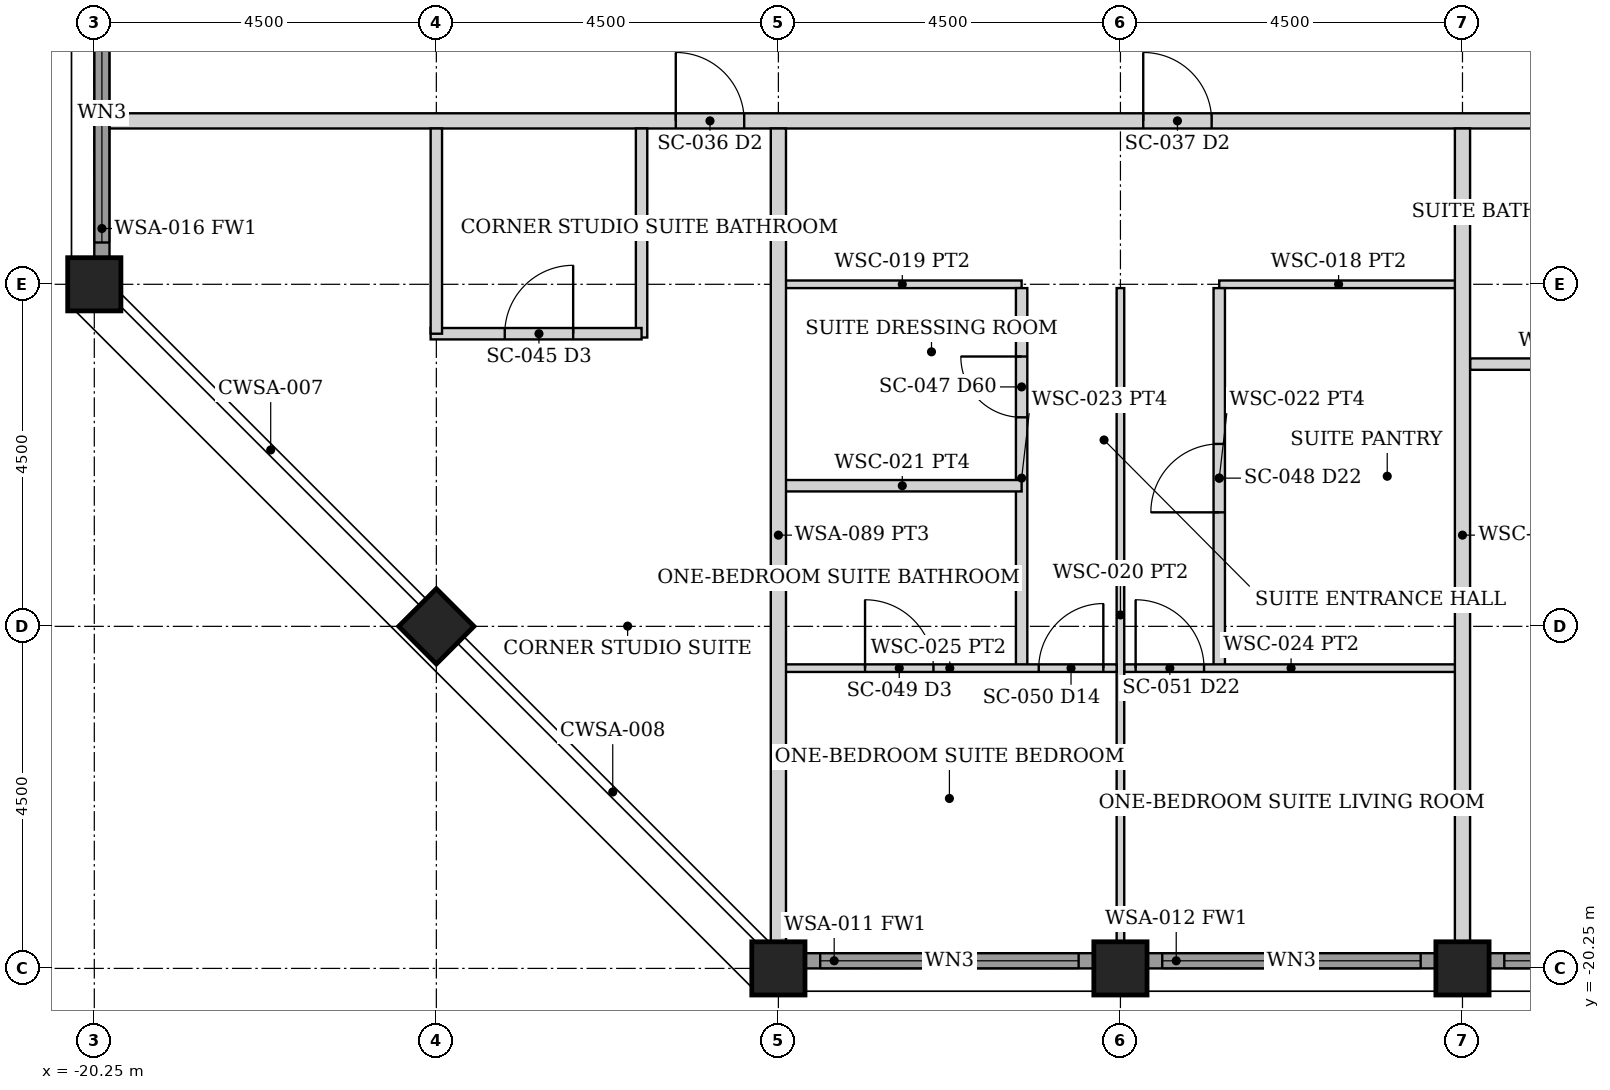
"""IFC4 building model, lengths in metres.
Left out: names, types, materials, properties, quantities, classifications, styles, units other than length and angle.
Written with IfcOpenShell. Run it as: python <this file> out.ifc"""

import sys

from ifc_helpers import new_model, si_unit, direction, frame, frame_2d, origin, origin_2d, place, context, subcontext, project, spatial, rectangle, hollow_rectangle, extrude, element, fill, save


model = new_model("IFC4")
c1 = context("Model", 3, precision=1e-05, world=origin(), true_north=direction((0.0, 1.0)))
c2 = subcontext(c1, "Body", "Model", "MODEL_VIEW")
j1 = project(units=[si_unit("LENGTHUNIT", "METRE"), si_unit("PLANEANGLEUNIT", "RADIAN")], contexts=[c1])
p1 = place(None, origin())
s1 = spatial("IfcSite", under=j1, at=p1, CompositionType="ELEMENT")
p2 = place(p1, origin())
s2 = spatial("IfcBuilding", under=s1, at=p2, CompositionType="ELEMENT")
p3 = place(p2, frame((0.0, 0.0, 223.3)))
s3 = spatial("IfcBuildingStorey", under=s2, at=p3, CompositionType="ELEMENT", Elevation=223.3)
for number, where, z_axis, x_axis in (
    (1, (-11.25, -20.25, 0.0), (0.0, 0.0, 1.0), (0.0, 1.0, 0.0)),
    (2, (-20.25, -11.25, 0.0), (0.0, 0.0, 1.0), (1.0, 0.0, 0.0)),
    (3, (-6.75, -20.25, 0.0), (0.0, 0.0, 1.0), (0.0, 1.0, 0.0)),
    (4, (-2.25, -20.25, 0.0), (0.0, 0.0, 1.0), (0.0, 1.0, 0.0)),
    (5, (-15.75, -15.75, 0.0), (0.0, 0.0, 1.0), (0.707, 0.707, 0.0)),
):
    element("IfcColumn", number, at=place(p3, frame(where, z_axis=z_axis, x_axis=x_axis)), inside=s3, PredefinedType="COLUMN", context=c2, shape_type="SweptSolid", body=[
        extrude(hollow_rectangle(XDim=0.7, YDim=0.7, WallThickness=0.04, at=origin_2d()), origin(), (0.0, 0.0, 1.0), 3.75),
    ])
p4 = place(p3, frame((-10.895, -20.15, 0.0), z_axis=(0.0, 0.0, 1.0), x_axis=(1.0, 0.0, 0.0)))
e6 = element("IfcWall", 6, at=p4, inside=s3, PredefinedType="SOLIDWALL", context=c2, shape_type="SweptSolid", body=[
    extrude(rectangle(XDim=3.79, YDim=0.2, at=frame_2d((1.895, 0.0))), origin(), (0.0, 0.0, 1.0), 2.629),
])
p5 = place(p4, frame((0.195, 0.0, 0.3)))
e7 = element("IfcOpeningElement", 7, at=p5, cuts=e6, PredefinedType="OPENING", context=c2, shape_type="SweptSolid", body=[
    extrude(rectangle(XDim=3.4, YDim=2.179, at=frame_2d((1.7, 1.089))), frame((0.0, 0.11, 0.0), z_axis=(0.0, -1.0, 0.0), x_axis=(1.0, 0.0, 0.0)), (0.0, 0.0, 1.0), 0.22),
])
p6 = place(p3, frame((-6.395, -20.15, 0.0), z_axis=(0.0, 0.0, 1.0), x_axis=(1.0, 0.0, 0.0)))
e8 = element("IfcWall", 8, at=p6, inside=s3, PredefinedType="SOLIDWALL", context=c2, shape_type="SweptSolid", body=[
    extrude(rectangle(XDim=3.79, YDim=0.2, at=frame_2d((1.895, 0.0))), origin(), (0.0, 0.0, 1.0), 2.629),
])
p7 = place(p6, frame((0.195, 0.0, 0.3)))
e9 = element("IfcOpeningElement", 9, at=p7, cuts=e8, PredefinedType="OPENING", context=c2, shape_type="SweptSolid", body=[
    extrude(rectangle(XDim=3.4, YDim=2.179, at=frame_2d((1.7, 1.089))), frame((0.0, 0.11, 0.0), z_axis=(0.0, -1.0, 0.0), x_axis=(1.0, 0.0, 0.0)), (0.0, 0.0, 1.0), 0.22),
])
p8 = place(p3, frame((-1.895, -20.15, 0.0), z_axis=(0.0, 0.0, 1.0), x_axis=(1.0, 0.0, 0.0)))
e10 = element("IfcWall", 10, at=p8, inside=s3, PredefinedType="SOLIDWALL", context=c2, shape_type="SweptSolid", body=[
    extrude(rectangle(XDim=3.79, YDim=0.2, at=frame_2d((1.895, 0.0))), origin(), (0.0, 0.0, 1.0), 2.629),
])
p9 = place(p8, frame((0.195, 0.0, 0.3)))
e11 = element("IfcOpeningElement", 11, at=p9, cuts=e10, PredefinedType="OPENING", context=c2, shape_type="SweptSolid", body=[
    extrude(rectangle(XDim=3.4, YDim=2.179, at=frame_2d((1.7, 1.089))), frame((0.0, 0.11, 0.0), z_axis=(0.0, -1.0, 0.0), x_axis=(1.0, 0.0, 0.0)), (0.0, 0.0, 1.0), 0.22),
])
p10 = place(p3, frame((-20.15, -10.895, 0.0), z_axis=(0.0, 0.0, 1.0), x_axis=(0.0, 1.0, 0.0)))
e12 = element("IfcWall", 12, at=p10, inside=s3, PredefinedType="SOLIDWALL", context=c2, shape_type="SweptSolid", body=[
    extrude(rectangle(XDim=3.79, YDim=0.2, at=frame_2d((1.895, 0.0))), origin(), (0.0, 0.0, 1.0), 2.629),
])
p11 = place(p10, frame((0.195, 0.0, 0.3)))
e13 = element("IfcOpeningElement", 13, at=p11, cuts=e12, PredefinedType="OPENING", context=c2, shape_type="SweptSolid", body=[
    extrude(rectangle(XDim=3.4, YDim=2.179, at=frame_2d((1.7, 1.089))), frame((0.0, 0.11, 0.0), z_axis=(0.0, -1.0, 0.0), x_axis=(1.0, 0.0, 0.0)), (0.0, 0.0, 1.0), 0.22),
])
p12 = place(p3, frame((-20.05, -9.1, 0.0), z_axis=(0.0, 0.0, 1.0), x_axis=(1.0, 0.0, 0.0)))
e14 = element("IfcWall", 14, at=p12, inside=s3, PredefinedType="PARTITIONING", context=c2, shape_type="SweptSolid", body=[
    extrude(rectangle(XDim=40.1, YDim=0.2, at=frame_2d((20.05, 0.0))), origin(), (0.0, 0.0, 1.0), 2.629),
])
p13 = place(p12, frame((13.6, 0.0, 0.0)))
e15 = element("IfcOpeningElement", 15, at=p13, cuts=e14, PredefinedType="OPENING", context=c2, shape_type="SweptSolid", body=[
    extrude(rectangle(XDim=0.9, YDim=2.1, at=frame_2d((0.45, 1.05))), frame((0.0, 0.11, 0.0), z_axis=(0.0, -1.0, 0.0), x_axis=(1.0, 0.0, 0.0)), (0.0, 0.0, 1.0), 0.22),
])
p14 = place(p12, frame((21.2, 0.0, 0.0)))
e16 = element("IfcOpeningElement", 16, at=p14, cuts=e14, PredefinedType="OPENING", context=c2, shape_type="SweptSolid", body=[
    extrude(rectangle(XDim=0.9, YDim=2.1, at=frame_2d((0.45, 1.05))), frame((0.0, 0.11, 0.0), z_axis=(0.0, -1.0, 0.0), x_axis=(1.0, 0.0, 0.0)), (0.0, 0.0, 1.0), 0.22),
])
p15 = place(p12, frame((22.5, 0.0, 0.0)))
e17 = element("IfcOpeningElement", 17, at=p15, cuts=e14, PredefinedType="OPENING", context=c2, shape_type="SweptSolid", body=[
    extrude(rectangle(XDim=0.9, YDim=2.1, at=frame_2d((0.45, 1.05))), frame((0.0, 0.11, 0.0), z_axis=(0.0, -1.0, 0.0), x_axis=(1.0, 0.0, 0.0)), (0.0, 0.0, 1.0), 0.22),
])
p16 = place(p12, frame((30.2, 0.0, 0.0)))
e18 = element("IfcOpeningElement", 18, at=p16, cuts=e14, PredefinedType="OPENING", context=c2, shape_type="SweptSolid", body=[
    extrude(rectangle(XDim=0.9, YDim=2.1, at=frame_2d((0.45, 1.05))), frame((0.0, 0.11, 0.0), z_axis=(0.0, -1.0, 0.0), x_axis=(1.0, 0.0, 0.0)), (0.0, 0.0, 1.0), 0.22),
])
p17 = place(p12, frame((31.75, 0.0, 0.0)))
e19 = element("IfcOpeningElement", 19, at=p17, cuts=e14, PredefinedType="OPENING", context=c2, shape_type="SweptSolid", body=[
    extrude(rectangle(XDim=0.9, YDim=2.1, at=frame_2d((0.45, 1.05))), frame((0.0, 0.11, 0.0), z_axis=(0.0, -1.0, 0.0), x_axis=(1.0, 0.0, 0.0)), (0.0, 0.0, 1.0), 0.22),
])
p18 = place(p12, frame((7.45, 0.0, 0.0)))
e20 = element("IfcOpeningElement", 20, at=p18, cuts=e14, PredefinedType="OPENING", context=c2, shape_type="SweptSolid", body=[
    extrude(rectangle(XDim=0.9, YDim=2.1, at=frame_2d((0.45, 1.05))), frame((0.0, 0.11, 0.0), z_axis=(0.0, -1.0, 0.0), x_axis=(1.0, 0.0, 0.0)), (0.0, 0.0, 1.0), 0.22),
])
p19 = place(p3, frame((-5.45, -11.25, 0.0), z_axis=(0.0, 0.0, 1.0), x_axis=(1.0, 0.0, 0.0)))
e21 = element("IfcWall", 21, at=p19, inside=s3, PredefinedType="PARTITIONING", context=c2, shape_type="SweptSolid", body=[
    extrude(rectangle(XDim=3.14, YDim=0.1, at=frame_2d((1.57, 0.0))), origin(), (0.0, 0.0, 1.0), 2.629),
])
p20 = place(p3, frame((-5.45, -16.3, 0.0), z_axis=(0.0, 0.0, 1.0), x_axis=(0.0, 1.0, 0.0)))
e22 = element("IfcWall", 22, at=p20, inside=s3, PredefinedType="PARTITIONING", context=c2, shape_type="SweptSolid", body=[
    extrude(rectangle(XDim=5.0, YDim=0.15, at=frame_2d((2.5, 0.0))), origin(), (0.0, 0.0, 1.0), 2.629),
])
p21 = place(p20, frame((2.05, 0.0, 0.0)))
e23 = element("IfcOpeningElement", 23, at=p21, cuts=e22, PredefinedType="OPENING", context=c2, shape_type="SweptSolid", body=[
    extrude(rectangle(XDim=0.9, YDim=2.1, at=frame_2d((0.45, 1.05))), frame((0.0, 0.085, 0.0), z_axis=(0.0, -1.0, 0.0), x_axis=(1.0, 0.0, 0.0)), (0.0, 0.0, 1.0), 0.17),
])
p22 = place(p3, frame((-6.7, -16.3, 0.0), z_axis=(0.0, 0.0, 1.0), x_axis=(1.0, 0.0, 0.0)))
e24 = element("IfcWall", 24, at=p22, inside=s3, PredefinedType="PARTITIONING", context=c2, shape_type="SweptSolid", body=[
    extrude(rectangle(XDim=4.39, YDim=0.1, at=frame_2d((2.195, 0.0))), origin(), (0.0, 0.0, 1.0), 2.629),
])
p23 = place(p22, frame((0.15, 0.0, 0.0)))
e25 = element("IfcOpeningElement", 25, at=p23, cuts=e24, PredefinedType="OPENING", context=c2, shape_type="SweptSolid", body=[
    extrude(rectangle(XDim=0.9, YDim=2.1, at=frame_2d((0.45, 1.05))), frame((0.0, 0.06, 0.0), z_axis=(0.0, -1.0, 0.0), x_axis=(1.0, 0.0, 0.0)), (0.0, 0.0, 1.0), 0.12),
])
p24 = place(p3, frame((-6.75, -19.9, 0.0), z_axis=(0.0, 0.0, 1.0), x_axis=(0.0, 1.0, 0.0)))
e26 = element("IfcWall", 26, at=p24, inside=s3, PredefinedType="PARTITIONING", context=c2, shape_type="SweptSolid", body=[
    extrude(rectangle(XDim=8.6, YDim=0.1, at=frame_2d((4.3, 0.0))), origin(), (0.0, 0.0, 1.0), 2.629),
])
p25 = place(p3, frame((-11.19, -11.25, 0.0), z_axis=(0.0, 0.0, 1.0), x_axis=(1.0, 0.0, 0.0)))
e27 = element("IfcWall", 27, at=p25, inside=s3, PredefinedType="PARTITIONING", context=c2, shape_type="SweptSolid", body=[
    extrude(rectangle(XDim=3.14, YDim=0.1, at=frame_2d((1.57, 0.0))), origin(), (0.0, 0.0, 1.0), 2.629),
])
p26 = place(p3, frame((-8.05, -16.3, 0.0), z_axis=(0.0, 0.0, 1.0), x_axis=(0.0, 1.0, 0.0)))
e28 = element("IfcWall", 28, at=p26, inside=s3, PredefinedType="PARTITIONING", context=c2, shape_type="SweptSolid", body=[
    extrude(rectangle(XDim=5.0, YDim=0.15, at=frame_2d((2.5, 0.0))), origin(), (0.0, 0.0, 1.0), 2.629),
])
p27 = place(p26, frame((3.3, 0.0, 0.0)))
e29 = element("IfcOpeningElement", 29, at=p27, cuts=e28, PredefinedType="OPENING", context=c2, shape_type="SweptSolid", body=[
    extrude(rectangle(XDim=0.8, YDim=2.1, at=frame_2d((0.4, 1.05))), frame((0.0, 0.085, 0.0), z_axis=(0.0, -1.0, 0.0), x_axis=(1.0, 0.0, 0.0)), (0.0, 0.0, 1.0), 0.17),
])
p28 = place(p3, frame((-11.19, -16.3, 0.0), z_axis=(0.0, 0.0, 1.0), x_axis=(1.0, 0.0, 0.0)))
e30 = element("IfcWall", 30, at=p28, inside=s3, PredefinedType="PARTITIONING", context=c2, shape_type="SweptSolid", body=[
    extrude(rectangle(XDim=4.39, YDim=0.1, at=frame_2d((2.195, 0.0))), origin(), (0.0, 0.0, 1.0), 2.629),
])
p29 = place(p28, frame((3.365, 0.0, 0.0)))
e31 = element("IfcOpeningElement", 31, at=p29, cuts=e30, PredefinedType="OPENING", context=c2, shape_type="SweptSolid", body=[
    extrude(rectangle(XDim=0.85, YDim=2.1, at=frame_2d((0.425, 1.05))), frame((0.0, 0.06, 0.0), z_axis=(0.0, -1.0, 0.0), x_axis=(1.0, 0.0, 0.0)), (0.0, 0.0, 1.0), 0.12),
])
p30 = place(p28, frame((1.08, 0.0, 0.0)))
e32 = element("IfcOpeningElement", 32, at=p30, cuts=e30, PredefinedType="OPENING", context=c2, shape_type="SweptSolid", body=[
    extrude(rectangle(XDim=0.9, YDim=2.1, at=frame_2d((0.45, 1.05))), frame((0.0, 0.06, 0.0), z_axis=(0.0, -1.0, 0.0), x_axis=(1.0, 0.0, 0.0)), (0.0, 0.0, 1.0), 0.12),
])
p31 = place(p3, frame((-11.19, -13.9, 0.0), z_axis=(0.0, 0.0, 1.0), x_axis=(1.0, 0.0, 0.0)))
e33 = element("IfcWall", 33, at=p31, inside=s3, PredefinedType="PARTITIONING", context=c2, shape_type="SweptSolid", body=[
    extrude(rectangle(XDim=3.14, YDim=0.15, at=frame_2d((1.57, 0.0))), origin(), (0.0, 0.0, 1.0), 2.629),
])
p32 = place(p3, frame((-2.15, -12.3, 0.0), z_axis=(0.0, 0.0, 1.0), x_axis=(1.0, 0.0, 0.0)))
e34 = element("IfcWall", 34, at=p32, inside=s3, PredefinedType="PARTITIONING", context=c2, shape_type="SweptSolid", body=[
    extrude(rectangle(XDim=3.05, YDim=0.15, at=frame_2d((1.525, 0.0))), origin(), (0.0, 0.0, 1.0), 2.629),
])
for number, where, z_axis, x_axis in (
    (35, (-11.25, -19.9, 0.0), (0.0, 0.0, 1.0), (0.0, 1.0, 0.0)),
    (36, (-2.25, -19.9, 0.0), (0.0, 0.0, 1.0), (0.0, 1.0, 0.0)),
):
    element("IfcWall", number, at=place(p3, frame(where, z_axis=z_axis, x_axis=x_axis)), inside=s3, PredefinedType="PARTITIONING", context=c2, shape_type="SweptSolid", body=[
        extrude(rectangle(XDim=10.7, YDim=0.2, at=frame_2d((5.35, 0.0))), origin(), (0.0, 0.0, 1.0), 2.629),
    ])
p33 = place(p3, frame((-13.05, -11.95, 0.0), z_axis=(0.0, 0.0, 1.0), x_axis=(0.0, 1.0, 0.0)))
e37 = element("IfcWall", 37, at=p33, inside=s3, PredefinedType="PARTITIONING", context=c2, shape_type="SweptSolid", body=[
    extrude(rectangle(XDim=2.75, YDim=0.15, at=frame_2d((1.375, 0.0))), origin(), (0.0, 0.0, 1.0), 2.629),
])
p34 = place(p3, frame((-15.825, -11.9, 0.0), z_axis=(0.0, 0.0, 1.0), x_axis=(1.0, 0.0, 0.0)))
e38 = element("IfcWall", 38, at=p34, inside=s3, PredefinedType="PARTITIONING", context=c2, shape_type="SweptSolid", body=[
    extrude(rectangle(XDim=2.775, YDim=0.15, at=frame_2d((1.387, 0.0))), origin(), (0.0, 0.0, 1.0), 2.629),
])
p35 = place(p34, frame((0.975, 0.0, 0.0)))
e39 = element("IfcOpeningElement", 39, at=p35, cuts=e38, PredefinedType="OPENING", context=c2, shape_type="SweptSolid", body=[
    extrude(rectangle(XDim=0.9, YDim=2.1, at=frame_2d((0.45, 1.05))), frame((0.0, 0.085, 0.0), z_axis=(0.0, -1.0, 0.0), x_axis=(1.0, 0.0, 0.0)), (0.0, 0.0, 1.0), 0.17),
])
p36 = place(p3, frame((-15.75, -11.9, 0.0), z_axis=(0.0, 0.0, 1.0), x_axis=(0.0, 1.0, 0.0)))
e40 = element("IfcWall", 40, at=p36, inside=s3, PredefinedType="PARTITIONING", context=c2, shape_type="SweptSolid", body=[
    extrude(rectangle(XDim=2.7, YDim=0.15, at=frame_2d((1.35, 0.0))), origin(), (0.0, 0.0, 1.0), 2.629),
])
p37 = place(p5, origin())
e41 = element("IfcWindow", 41, at=p37, inside=s3, PartitioningType="SINGLE_PANEL", PredefinedType="WINDOW", context=c2, shape_type="SweptSolid", body=[
    extrude(rectangle(XDim=3.4, YDim=2.179, at=frame_2d((1.7, 1.089))), frame((0.0, 0.03, 0.0), z_axis=(0.0, -1.0, 0.0), x_axis=(1.0, 0.0, 0.0)), (0.0, 0.0, 1.0), 0.06),
])
fill(e7, e41)
p38 = place(p7, origin())
e42 = element("IfcWindow", 42, at=p38, inside=s3, PartitioningType="SINGLE_PANEL", PredefinedType="WINDOW", context=c2, shape_type="SweptSolid", body=[
    extrude(rectangle(XDim=3.4, YDim=2.179, at=frame_2d((1.7, 1.089))), frame((0.0, 0.03, 0.0), z_axis=(0.0, -1.0, 0.0), x_axis=(1.0, 0.0, 0.0)), (0.0, 0.0, 1.0), 0.06),
])
fill(e9, e42)
p39 = place(p9, origin())
e43 = element("IfcWindow", 43, at=p39, inside=s3, PartitioningType="SINGLE_PANEL", PredefinedType="WINDOW", context=c2, shape_type="SweptSolid", body=[
    extrude(rectangle(XDim=3.4, YDim=2.179, at=frame_2d((1.7, 1.089))), frame((0.0, 0.03, 0.0), z_axis=(0.0, -1.0, 0.0), x_axis=(1.0, 0.0, 0.0)), (0.0, 0.0, 1.0), 0.06),
])
fill(e11, e43)
p40 = place(p11, origin())
e44 = element("IfcWindow", 44, at=p40, inside=s3, PartitioningType="SINGLE_PANEL", PredefinedType="WINDOW", context=c2, shape_type="SweptSolid", body=[
    extrude(rectangle(XDim=3.4, YDim=2.179, at=frame_2d((1.7, 1.089))), frame((0.0, 0.03, 0.0), z_axis=(0.0, -1.0, 0.0), x_axis=(1.0, 0.0, 0.0)), (0.0, 0.0, 1.0), 0.06),
])
fill(e13, e44)
p41 = place(p13, origin())
e45 = element("IfcDoor", 45, at=p41, inside=s3, OperationType="SINGLE_SWING_LEFT", PredefinedType="DOOR", context=c2, shape_type="SweptSolid", body=[
    extrude(rectangle(XDim=0.9, YDim=2.1, at=frame_2d((0.45, 1.05))), frame((0.0, 0.025, 0.0), z_axis=(0.0, -1.0, 0.0), x_axis=(1.0, 0.0, 0.0)), (0.0, 0.0, 1.0), 0.05),
])
fill(e15, e45)
p42 = place(p21, origin())
e46 = element("IfcDoor", 46, at=p42, inside=s3, OperationType="SINGLE_SWING_LEFT", PredefinedType="DOOR", context=c2, shape_type="SweptSolid", body=[
    extrude(rectangle(XDim=0.9, YDim=2.1, at=frame_2d((0.45, 1.05))), frame((0.0, 0.025, 0.0), z_axis=(0.0, -1.0, 0.0), x_axis=(1.0, 0.0, 0.0)), (0.0, 0.0, 1.0), 0.05),
])
fill(e23, e46)
p43 = place(p23, origin())
e47 = element("IfcDoor", 47, at=p43, inside=s3, OperationType="SINGLE_SWING_LEFT", PredefinedType="DOOR", context=c2, shape_type="SweptSolid", body=[
    extrude(rectangle(XDim=0.9, YDim=2.1, at=frame_2d((0.45, 1.05))), frame((0.0, 0.025, 0.0), z_axis=(0.0, -1.0, 0.0), x_axis=(1.0, 0.0, 0.0)), (0.0, 0.0, 1.0), 0.05),
])
fill(e25, e47)
p44 = place(p29, origin())
e48 = element("IfcDoor", 48, at=p44, inside=s3, OperationType="SINGLE_SWING_RIGHT", PredefinedType="DOOR", context=c2, shape_type="SweptSolid", body=[
    extrude(rectangle(XDim=0.85, YDim=2.1, at=frame_2d((0.425, 1.05))), frame((0.0, 0.025, 0.0), z_axis=(0.0, -1.0, 0.0), x_axis=(1.0, 0.0, 0.0)), (0.0, 0.0, 1.0), 0.05),
])
fill(e31, e48)
p45 = place(p27, origin())
e49 = element("IfcDoor", 49, at=p45, inside=s3, OperationType="SINGLE_SWING_RIGHT", PredefinedType="DOOR", context=c2, shape_type="SweptSolid", body=[
    extrude(rectangle(XDim=0.8, YDim=2.1, at=frame_2d((0.4, 1.05))), frame((0.0, 0.025, 0.0), z_axis=(0.0, -1.0, 0.0), x_axis=(1.0, 0.0, 0.0)), (0.0, 0.0, 1.0), 0.05),
])
fill(e29, e49)
p46 = place(p30, origin())
e50 = element("IfcDoor", 50, at=p46, inside=s3, OperationType="SINGLE_SWING_LEFT", PredefinedType="DOOR", context=c2, shape_type="SweptSolid", body=[
    extrude(rectangle(XDim=0.9, YDim=2.1, at=frame_2d((0.45, 1.05))), frame((0.0, 0.025, 0.0), z_axis=(0.0, -1.0, 0.0), x_axis=(1.0, 0.0, 0.0)), (0.0, 0.0, 1.0), 0.05),
])
fill(e32, e50)
p47 = place(p18, origin())
e51 = element("IfcDoor", 51, at=p47, inside=s3, OperationType="SINGLE_SWING_LEFT", PredefinedType="DOOR", context=c2, shape_type="SweptSolid", body=[
    extrude(rectangle(XDim=0.9, YDim=2.1, at=frame_2d((0.45, 1.05))), frame((0.0, 0.025, 0.0), z_axis=(0.0, -1.0, 0.0), x_axis=(1.0, 0.0, 0.0)), (0.0, 0.0, 1.0), 0.05),
])
fill(e20, e51)
p48 = place(p35, origin())
e52 = element("IfcDoor", 52, at=p48, inside=s3, OperationType="SINGLE_SWING_RIGHT", PredefinedType="DOOR", context=c2, shape_type="SweptSolid", body=[
    extrude(rectangle(XDim=0.9, YDim=2.1, at=frame_2d((0.45, 1.05))), frame((0.0, 0.025, 0.0), z_axis=(0.0, -1.0, 0.0), x_axis=(1.0, 0.0, 0.0)), (0.0, 0.0, 1.0), 0.05),
])
fill(e39, e52)
save(model, sys.argv[1])
